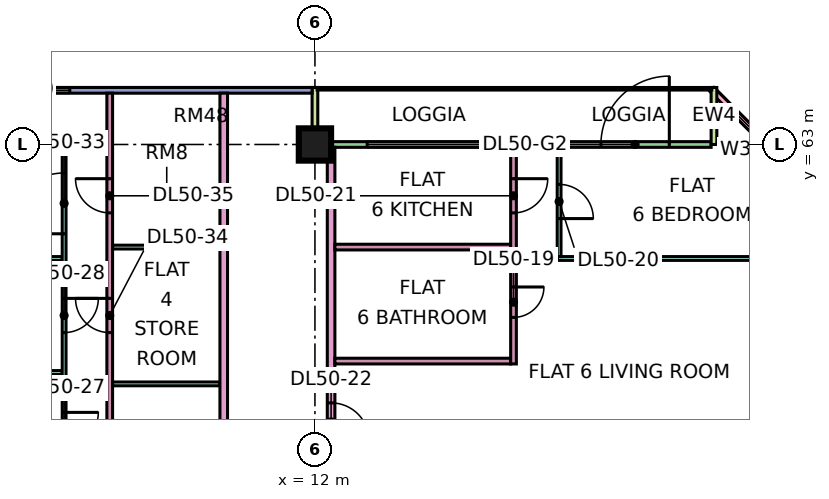
"""IFC4 building model, lengths in metres.
Left out: names, types, materials, properties, quantities, classifications, styles, units other than length and angle.
Written with IfcOpenShell. Run it as: python <this file> out.ifc"""

import sys

from ifc_helpers import new_model, si_unit, direction, frame, frame_2d, origin, origin_2d, place, context, subcontext, project, spatial, rectangle, extrude, element, fill, save


model = new_model("IFC4")
c1 = context("Model", 3, precision=1e-05, world=origin(), true_north=direction((0.0, 1.0)))
c2 = subcontext(c1, "Body", "Model", "MODEL_VIEW")
j1 = project(units=[si_unit("LENGTHUNIT", "METRE"), si_unit("PLANEANGLEUNIT", "RADIAN")], contexts=[c1])
p1 = place(None, origin())
s1 = spatial("IfcSite", under=j1, at=p1, CompositionType="ELEMENT")
p2 = place(p1, origin())
s2 = spatial("IfcBuilding", under=s1, at=p2, CompositionType="ELEMENT")
p3 = place(p2, frame((0.0, 0.0, 215.4)))
s3 = spatial("IfcBuildingStorey", under=s2, at=p3, CompositionType="ELEMENT", Elevation=215.4)
p4 = place(p3, frame((12.0, 63.0, 0.0), z_axis=(0.0, 0.0, 1.0), x_axis=(1.0, 0.0, 0.0)))
e1 = element("IfcColumn", 1, at=p4, inside=s3, PredefinedType="COLUMN", context=c2, shape_type="SweptSolid", body=[
    extrude(rectangle(XDim=0.85, YDim=0.85, at=origin_2d()), origin(), (0.0, 0.0, 1.0), 3.75),
])
p5 = place(p3, frame((25.447, 61.447, 0.0), z_axis=(0.0, 0.0, 1.0), x_axis=(-0.707106781187, 0.707106781187, 0.0)))
e2 = element("IfcWall", 2, at=p5, inside=s3, PredefinedType="SOLIDWALL", context=c2, shape_type="SweptSolid", body=[
    extrude(rectangle(XDim=4.243, YDim=0.15, at=frame_2d((2.121, 0.0))), origin(), (0.0, 0.0, 1.0), 3.35),
])
p6 = place(p5, frame((0.498, 0.0, 0.45)))
e3 = element("IfcOpeningElement", 3, at=p6, cuts=e2, PredefinedType="OPENING", context=c2, shape_type="SweptSolid", body=[
    extrude(rectangle(XDim=3.0, YDim=2.4, at=frame_2d((1.5, 1.2))), frame((0.0, 0.085, 0.0), z_axis=(0.0, -1.0, 0.0), x_axis=(1.0, 0.0, 0.0)), (0.0, 0.0, 1.0), 0.17),
])
p7 = place(p3, frame((22.425, 63.0, 0.0), z_axis=(0.0, 0.0, 1.0), x_axis=(-1.0, 0.0, 0.0)))
e4 = element("IfcWall", 4, at=p7, inside=s3, PredefinedType="SOLIDWALL", context=c2, shape_type="SweptSolid", body=[
    extrude(rectangle(XDim=10.35, YDim=0.15, at=frame_2d((5.175, 0.0))), origin(), (0.0, 0.0, 1.0), 3.35),
])
p8 = place(p7, frame((1.1, 0.0, 0.0)))
e5 = element("IfcOpeningElement", 5, at=p8, cuts=e4, PredefinedType="OPENING", context=c2, shape_type="SweptSolid", body=[
    extrude(rectangle(XDim=1.8, YDim=2.4, at=frame_2d((0.9, 1.2))), frame((0.0, 0.085, 0.0), z_axis=(0.0, -1.0, 0.0), x_axis=(1.0, 0.0, 0.0)), (0.0, 0.0, 1.0), 0.17),
])
p9 = place(p7, frame((6.05, 0.0, 0.45)))
e6 = element("IfcOpeningElement", 6, at=p9, cuts=e4, PredefinedType="OPENING", context=c2, shape_type="SweptSolid", body=[
    extrude(rectangle(XDim=3.0, YDim=2.4, at=frame_2d((1.5, 1.2))), frame((0.0, 0.085, 0.0), z_axis=(0.0, -1.0, 0.0), x_axis=(1.0, 0.0, 0.0)), (0.0, 0.0, 1.0), 0.17),
])
for number, where, z_axis, x_axis in (
    (7, (22.5, 64.5, 0.0), (0.0, 0.0, 1.0), (0.0, -1.0, 0.0)),
    (8, (12.0, 64.5, 0.0), (0.0, 0.0, 1.0), (0.0, -1.0, 0.0)),
):
    element("IfcWall", number, at=place(p3, frame(where, z_axis=z_axis, x_axis=x_axis)), inside=s3, PredefinedType="SOLIDWALL", context=c2, shape_type="SweptSolid", body=[
        extrude(rectangle(XDim=1.5, YDim=0.15, at=frame_2d((0.75, 0.0))), origin(), (0.0, 0.0, 1.0), 3.35),
    ])
p10 = place(p3, frame((11.925, 64.425, 0.0), z_axis=(0.0, 0.0, 1.0), x_axis=(-1.0, 0.0, 0.0)))
e9 = element("IfcWall", 9, at=p10, inside=s3, PredefinedType="SOLIDWALL", context=c2, shape_type="SweptSolid", body=[
    extrude(rectangle(XDim=10.425, YDim=0.15, at=frame_2d((5.212, 0.0))), origin(), (0.0, 0.0, 1.0), 3.35),
])
p11 = place(p10, frame((6.375, 0.0, 0.45)))
e10 = element("IfcOpeningElement", 10, at=p11, cuts=e9, PredefinedType="OPENING", context=c2, shape_type="SweptSolid", body=[
    extrude(rectangle(XDim=3.6, YDim=2.4, at=frame_2d((1.8, 1.2))), frame((0.0, 0.085, 0.0), z_axis=(0.0, -1.0, 0.0), x_axis=(1.0, 0.0, 0.0)), (0.0, 0.0, 1.0), 0.17),
])
for number, where, z_axis, x_axis in (
    (11, (-1.351, 57.0, 0.0), (0.0, 0.0, 1.0), (1.0, 0.0, 0.0)),
    (12, (-1.351, 60.0, 0.0), (0.0, 0.0, 1.0), (1.0, 0.0, 0.0)),
):
    element("IfcWall", number, at=place(p3, frame(where, z_axis=z_axis, x_axis=x_axis)), inside=s3, PredefinedType="PARTITIONING", context=c2, shape_type="SweptSolid", body=[
        extrude(rectangle(XDim=6.701, YDim=0.1, at=frame_2d((3.351, 0.0))), origin(), (0.0, 0.0, 1.0), 3.35),
    ])
p12 = place(p3, frame((5.4, 36.1, 0.0), z_axis=(0.0, 0.0, 1.0), x_axis=(0.0, 1.0, 0.0)))
e13 = element("IfcWall", 13, at=p12, inside=s3, PredefinedType="PARTITIONING", context=c2, shape_type="SweptSolid", body=[
    extrude(rectangle(XDim=26.95, YDim=0.1, at=frame_2d((13.475, 0.0))), origin(), (0.0, 0.0, 1.0), 3.35),
])
p13 = place(p12, frame((0.95, 0.0, 0.0)))
e14 = element("IfcOpeningElement", 14, at=p13, cuts=e13, PredefinedType="OPENING", context=c2, shape_type="SweptSolid", body=[
    extrude(rectangle(XDim=0.9, YDim=2.1, at=frame_2d((0.45, 1.05))), frame((0.0, 0.06, 0.0), z_axis=(0.0, -1.0, 0.0), x_axis=(1.0, 0.0, 0.0)), (0.0, 0.0, 1.0), 0.12),
])
p14 = place(p12, frame((3.95, 0.0, 0.0)))
e15 = element("IfcOpeningElement", 15, at=p14, cuts=e13, PredefinedType="OPENING", context=c2, shape_type="SweptSolid", body=[
    extrude(rectangle(XDim=0.9, YDim=2.1, at=frame_2d((0.45, 1.05))), frame((0.0, 0.06, 0.0), z_axis=(0.0, -1.0, 0.0), x_axis=(1.0, 0.0, 0.0)), (0.0, 0.0, 1.0), 0.12),
])
p15 = place(p12, frame((15.95, 0.0, 0.0)))
e16 = element("IfcOpeningElement", 16, at=p15, cuts=e13, PredefinedType="OPENING", context=c2, shape_type="SweptSolid", body=[
    extrude(rectangle(XDim=0.9, YDim=2.1, at=frame_2d((0.45, 1.05))), frame((0.0, 0.06, 0.0), z_axis=(0.0, -1.0, 0.0), x_axis=(1.0, 0.0, 0.0)), (0.0, 0.0, 1.0), 0.12),
])
p16 = place(p12, frame((18.95, 0.0, 0.0)))
e17 = element("IfcOpeningElement", 17, at=p16, cuts=e13, PredefinedType="OPENING", context=c2, shape_type="SweptSolid", body=[
    extrude(rectangle(XDim=0.9, YDim=2.1, at=frame_2d((0.45, 1.05))), frame((0.0, 0.06, 0.0), z_axis=(0.0, -1.0, 0.0), x_axis=(1.0, 0.0, 0.0)), (0.0, 0.0, 1.0), 0.12),
])
p17 = place(p12, frame((21.95, 0.0, 0.0)))
e18 = element("IfcOpeningElement", 18, at=p17, cuts=e13, PredefinedType="OPENING", context=c2, shape_type="SweptSolid", body=[
    extrude(rectangle(XDim=0.9, YDim=2.1, at=frame_2d((0.45, 1.05))), frame((0.0, 0.06, 0.0), z_axis=(0.0, -1.0, 0.0), x_axis=(1.0, 0.0, 0.0)), (0.0, 0.0, 1.0), 0.12),
])
p18 = place(p12, frame((9.95, 0.0, 0.0)))
e19 = element("IfcOpeningElement", 19, at=p18, cuts=e13, PredefinedType="OPENING", context=c2, shape_type="SweptSolid", body=[
    extrude(rectangle(XDim=0.9, YDim=2.1, at=frame_2d((0.45, 1.05))), frame((0.0, 0.06, 0.0), z_axis=(0.0, -1.0, 0.0), x_axis=(1.0, 0.0, 0.0)), (0.0, 0.0, 1.0), 0.12),
])
p19 = place(p12, frame((24.55, 0.0, 0.0)))
e20 = element("IfcOpeningElement", 20, at=p19, cuts=e13, PredefinedType="OPENING", context=c2, shape_type="SweptSolid", body=[
    extrude(rectangle(XDim=1.6, YDim=2.1, at=frame_2d((0.8, 1.05))), frame((0.0, 0.06, 0.0), z_axis=(0.0, -1.0, 0.0), x_axis=(1.0, 0.0, 0.0)), (0.0, 0.0, 1.0), 0.12),
])
p20 = place(p3, frame((5.45, 63.0, 0.0), z_axis=(0.0, 0.0, 1.0), x_axis=(1.0, 0.0, 0.0)))
e21 = element("IfcWall", 21, at=p20, inside=s3, PredefinedType="PARTITIONING", context=c2, shape_type="SweptSolid", body=[
    extrude(rectangle(XDim=0.55, YDim=0.1, at=frame_2d((0.275, 0.0))), origin(), (0.0, 0.0, 1.0), 3.35),
])
p21 = place(p3, frame((6.6, 39.525, 0.0), z_axis=(0.0, 0.0, 1.0), x_axis=(0.0, 1.0, 0.0)))
e22 = element("IfcWall", 22, at=p21, inside=s3, PredefinedType="PARTITIONING", context=c2, shape_type="SweptSolid", body=[
    extrude(rectangle(XDim=24.825, YDim=0.15, at=frame_2d((12.413, 0.0))), origin(), (0.0, 0.0, 1.0), 3.35),
])
p22 = place(p21, frame((3.225, 0.0, 0.0)))
e23 = element("IfcOpeningElement", 23, at=p22, cuts=e22, PredefinedType="OPENING", context=c2, shape_type="SweptSolid", body=[
    extrude(rectangle(XDim=0.8, YDim=2.1, at=frame_2d((0.4, 1.05))), frame((0.0, 0.085, 0.0), z_axis=(0.0, -1.0, 0.0), x_axis=(1.0, 0.0, 0.0)), (0.0, 0.0, 1.0), 0.17),
])
p23 = place(p21, frame((13.875, 0.0, 0.0)))
e24 = element("IfcOpeningElement", 24, at=p23, cuts=e22, PredefinedType="OPENING", context=c2, shape_type="SweptSolid", body=[
    extrude(rectangle(XDim=0.9, YDim=2.1, at=frame_2d((0.45, 1.05))), frame((0.0, 0.085, 0.0), z_axis=(0.0, -1.0, 0.0), x_axis=(1.0, 0.0, 0.0)), (0.0, 0.0, 1.0), 0.17),
])
p24 = place(p21, frame((6.225, 0.0, 0.0)))
e25 = element("IfcOpeningElement", 25, at=p24, cuts=e22, PredefinedType="OPENING", context=c2, shape_type="SweptSolid", body=[
    extrude(rectangle(XDim=0.8, YDim=2.1, at=frame_2d((0.4, 1.05))), frame((0.0, 0.085, 0.0), z_axis=(0.0, -1.0, 0.0), x_axis=(1.0, 0.0, 0.0)), (0.0, 0.0, 1.0), 0.17),
])
p25 = place(p21, frame((18.525, 0.0, 0.0)))
e26 = element("IfcOpeningElement", 26, at=p25, cuts=e22, PredefinedType="OPENING", context=c2, shape_type="SweptSolid", body=[
    extrude(rectangle(XDim=0.9, YDim=2.1, at=frame_2d((0.45, 1.05))), frame((0.0, 0.085, 0.0), z_axis=(0.0, -1.0, 0.0), x_axis=(1.0, 0.0, 0.0)), (0.0, 0.0, 1.0), 0.17),
])
p26 = place(p21, frame((21.675, 0.0, 0.0)))
e27 = element("IfcOpeningElement", 27, at=p26, cuts=e22, PredefinedType="OPENING", context=c2, shape_type="SweptSolid", body=[
    extrude(rectangle(XDim=0.9, YDim=2.1, at=frame_2d((0.45, 1.05))), frame((0.0, 0.085, 0.0), z_axis=(0.0, -1.0, 0.0), x_axis=(1.0, 0.0, 0.0)), (0.0, 0.0, 1.0), 0.17),
])
p27 = place(p21, frame((9.375, 0.0, 0.0)))
e28 = element("IfcOpeningElement", 28, at=p27, cuts=e22, PredefinedType="OPENING", context=c2, shape_type="SweptSolid", body=[
    extrude(rectangle(XDim=0.8, YDim=2.1, at=frame_2d((0.4, 1.05))), frame((0.0, 0.085, 0.0), z_axis=(0.0, -1.0, 0.0), x_axis=(1.0, 0.0, 0.0)), (0.0, 0.0, 1.0), 0.17),
])
for number, where, z_axis, x_axis in (
    (29, (6.675, 56.7, 0.0), (0.0, 0.0, 1.0), (1.0, 0.0, 0.0)),
    (30, (6.675, 60.3, 0.0), (0.0, 0.0, 1.0), (1.0, 0.0, 0.0)),
):
    element("IfcWall", number, at=place(p3, frame(where, z_axis=z_axis, x_axis=x_axis)), inside=s3, PredefinedType="PARTITIONING", context=c2, shape_type="SweptSolid", body=[
        extrude(rectangle(XDim=2.825, YDim=0.1, at=frame_2d((1.413, 0.0))), origin(), (0.0, 0.0, 1.0), 3.35),
    ])
p28 = place(p3, frame((9.6, 20.0, 0.0), z_axis=(0.0, 0.0, 1.0), x_axis=(0.0, 1.0, 0.0)))
e31 = element("IfcWall", 31, at=p28, inside=s3, PredefinedType="PARTITIONING", context=c2, shape_type="SweptSolid", body=[
    extrude(rectangle(XDim=44.35, YDim=0.2, at=frame_2d((22.175, 0.0))), origin(), (0.0, 0.0, 1.0), 3.35),
])
p29 = place(p28, frame((17.25, 0.0, 0.0)))
e32 = element("IfcOpeningElement", 32, at=p29, cuts=e31, PredefinedType="OPENING", context=c2, shape_type="SweptSolid", body=[
    extrude(rectangle(XDim=1.0, YDim=2.1, at=frame_2d((0.5, 1.05))), frame((0.0, 0.11, 0.0), z_axis=(0.0, -1.0, 0.0), x_axis=(1.0, 0.0, 0.0)), (0.0, 0.0, 1.0), 0.22),
])
p30 = place(p28, frame((0.6, 0.0, 0.0)))
e33 = element("IfcOpeningElement", 33, at=p30, cuts=e31, PredefinedType="OPENING", context=c2, shape_type="SweptSolid", body=[
    extrude(rectangle(XDim=1.2, YDim=2.1, at=frame_2d((0.6, 1.05))), frame((0.0, 0.11, 0.0), z_axis=(0.0, -1.0, 0.0), x_axis=(1.0, 0.0, 0.0)), (0.0, 0.0, 1.0), 0.22),
])
p31 = place(p28, frame((4.35, 0.0, 0.0)))
e34 = element("IfcOpeningElement", 34, at=p31, cuts=e31, PredefinedType="OPENING", context=c2, shape_type="SweptSolid", body=[
    extrude(rectangle(XDim=1.0, YDim=2.1, at=frame_2d((0.5, 1.05))), frame((0.0, 0.11, 0.0), z_axis=(0.0, -1.0, 0.0), x_axis=(1.0, 0.0, 0.0)), (0.0, 0.0, 1.0), 0.22),
])
p32 = place(p3, frame((12.425, 20.0, 0.0), z_axis=(0.0, 0.0, 1.0), x_axis=(0.0, 1.0, 0.0)))
e35 = element("IfcWall", 35, at=p32, inside=s3, PredefinedType="PARTITIONING", context=c2, shape_type="SweptSolid", body=[
    extrude(rectangle(XDim=42.926, YDim=0.2, at=frame_2d((21.463, 0.0))), origin(), (0.0, 0.0, 1.0), 3.35),
])
p33 = place(p32, frame((7.0, 0.0, 0.0)))
e36 = element("IfcOpeningElement", 36, at=p33, cuts=e35, PredefinedType="OPENING", context=c2, shape_type="SweptSolid", body=[
    extrude(rectangle(XDim=1.0, YDim=2.1, at=frame_2d((0.5, 1.05))), frame((0.0, 0.11, 0.0), z_axis=(0.0, -1.0, 0.0), x_axis=(1.0, 0.0, 0.0)), (0.0, 0.0, 1.0), 0.22),
])
p34 = place(p32, frame((12.95, 0.0, 0.0)))
e37 = element("IfcOpeningElement", 37, at=p34, cuts=e35, PredefinedType="OPENING", context=c2, shape_type="SweptSolid", body=[
    extrude(rectangle(XDim=1.0, YDim=2.1, at=frame_2d((0.5, 1.05))), frame((0.0, 0.11, 0.0), z_axis=(0.0, -1.0, 0.0), x_axis=(1.0, 0.0, 0.0)), (0.0, 0.0, 1.0), 0.22),
])
p35 = place(p32, frame((23.35, 0.0, 0.0)))
e38 = element("IfcOpeningElement", 38, at=p35, cuts=e35, PredefinedType="OPENING", context=c2, shape_type="SweptSolid", body=[
    extrude(rectangle(XDim=1.0, YDim=2.1, at=frame_2d((0.5, 1.05))), frame((0.0, 0.11, 0.0), z_axis=(0.0, -1.0, 0.0), x_axis=(1.0, 0.0, 0.0)), (0.0, 0.0, 1.0), 0.22),
])
p36 = place(p32, frame((35.2, 0.0, 0.0)))
e39 = element("IfcOpeningElement", 39, at=p36, cuts=e35, PredefinedType="OPENING", context=c2, shape_type="SweptSolid", body=[
    extrude(rectangle(XDim=1.0, YDim=2.1, at=frame_2d((0.5, 1.05))), frame((0.0, 0.11, 0.0), z_axis=(0.0, -1.0, 0.0), x_axis=(1.0, 0.0, 0.0)), (0.0, 0.0, 1.0), 0.22),
])
p37 = place(p32, frame((1.15, 0.0, 0.0)))
e40 = element("IfcOpeningElement", 40, at=p37, cuts=e35, PredefinedType="OPENING", context=c2, shape_type="SweptSolid", body=[
    extrude(rectangle(XDim=1.8, YDim=2.1, at=frame_2d((0.9, 1.05))), frame((0.0, 0.11, 0.0), z_axis=(0.0, -1.0, 0.0), x_axis=(1.0, 0.0, 0.0)), (0.0, 0.0, 1.0), 0.22),
])
p38 = place(p32, frame((28.6, 0.0, 0.0)))
e41 = element("IfcOpeningElement", 41, at=p38, cuts=e35, PredefinedType="OPENING", context=c2, shape_type="SweptSolid", body=[
    extrude(rectangle(XDim=1.8, YDim=2.1, at=frame_2d((0.9, 1.05))), frame((0.0, 0.11, 0.0), z_axis=(0.0, -1.0, 0.0), x_axis=(1.0, 0.0, 0.0)), (0.0, 0.0, 1.0), 0.22),
])
for number, where, z_axis, x_axis in (
    (42, (12.525, 57.3, 0.0), (0.0, 0.0, 1.0), (1.0, 0.0, 0.0)),
    (43, (12.525, 60.3, 0.0), (0.0, 0.0, 1.0), (1.0, 0.0, 0.0)),
):
    element("IfcWall", number, at=place(p3, frame(where, z_axis=z_axis, x_axis=x_axis)), inside=s3, PredefinedType="PARTITIONING", context=c2, shape_type="SweptSolid", body=[
        extrude(rectangle(XDim=4.625, YDim=0.15, at=frame_2d((2.312, 0.0))), origin(), (0.0, 0.0, 1.0), 3.35),
    ])
p39 = place(p3, frame((17.225, 57.225, 0.0), z_axis=(0.0, 0.0, 1.0), x_axis=(0.0, 1.0, 0.0)))
e44 = element("IfcWall", 44, at=p39, inside=s3, PredefinedType="PARTITIONING", context=c2, shape_type="SweptSolid", body=[
    extrude(rectangle(XDim=5.701, YDim=0.15, at=frame_2d((2.851, 0.0))), origin(), (0.0, 0.0, 1.0), 3.35),
])
p40 = place(p39, frame((1.225, 0.0, 0.0)))
e45 = element("IfcOpeningElement", 45, at=p40, cuts=e44, PredefinedType="OPENING", context=c2, shape_type="SweptSolid", body=[
    extrude(rectangle(XDim=0.8, YDim=2.1, at=frame_2d((0.4, 1.05))), frame((0.0, 0.085, 0.0), z_axis=(0.0, -1.0, 0.0), x_axis=(1.0, 0.0, 0.0)), (0.0, 0.0, 1.0), 0.17),
])
p41 = place(p39, frame((3.975, 0.0, 0.0)))
e46 = element("IfcOpeningElement", 46, at=p41, cuts=e44, PredefinedType="OPENING", context=c2, shape_type="SweptSolid", body=[
    extrude(rectangle(XDim=0.9, YDim=2.1, at=frame_2d((0.45, 1.05))), frame((0.0, 0.085, 0.0), z_axis=(0.0, -1.0, 0.0), x_axis=(1.0, 0.0, 0.0)), (0.0, 0.0, 1.0), 0.17),
])
p42 = place(p3, frame((18.375, 60.0, 0.0), z_axis=(0.0, 0.0, 1.0), x_axis=(1.0, 0.0, 0.0)))
e47 = element("IfcWall", 47, at=p42, inside=s3, PredefinedType="PARTITIONING", context=c2, shape_type="SweptSolid", body=[
    extrude(rectangle(XDim=6.975, YDim=0.1, at=frame_2d((3.488, 0.0))), origin(), (0.0, 0.0, 1.0), 3.35),
])
p43 = place(p3, frame((18.425, 60.05, 0.0), z_axis=(0.0, 0.0, 1.0), x_axis=(0.0, 1.0, 0.0)))
e48 = element("IfcWall", 48, at=p43, inside=s3, PredefinedType="PARTITIONING", context=c2, shape_type="SweptSolid", body=[
    extrude(rectangle(XDim=2.876, YDim=0.1, at=frame_2d((1.438, 0.0))), origin(), (0.0, 0.0, 1.0), 3.35),
])
p44 = place(p43, frame((1.0, 0.0, 0.0)))
e49 = element("IfcOpeningElement", 49, at=p44, cuts=e48, PredefinedType="OPENING", context=c2, shape_type="SweptSolid", body=[
    extrude(rectangle(XDim=0.9, YDim=2.1, at=frame_2d((0.45, 1.05))), frame((0.0, 0.06, 0.0), z_axis=(0.0, -1.0, 0.0), x_axis=(1.0, 0.0, 0.0)), (0.0, 0.0, 1.0), 0.12),
])
p45 = place(p6, origin())
e50 = element("IfcWindow", 50, at=p45, inside=s3, PartitioningType="SINGLE_PANEL", PredefinedType="WINDOW", context=c2, shape_type="SweptSolid", body=[
    extrude(rectangle(XDim=3.0, YDim=2.4, at=frame_2d((1.5, 1.2))), frame((0.0, 0.03, 0.0), z_axis=(0.0, -1.0, 0.0), x_axis=(1.0, 0.0, 0.0)), (0.0, 0.0, 1.0), 0.06),
])
fill(e3, e50)
p46 = place(p8, frame((1.8, 0.0, 0.0), z_axis=(0.0, 0.0, 1.0), x_axis=(-1.0, 0.0, 0.0)))
e51 = element("IfcDoor", 51, at=p46, inside=s3, OperationType="DOUBLE_DOOR_SINGLE_SWING", PredefinedType="DOOR", context=c2, shape_type="SweptSolid", body=[
    extrude(rectangle(XDim=1.8, YDim=2.4, at=frame_2d((0.9, 1.2))), frame((0.0, 0.025, 0.0), z_axis=(0.0, -1.0, 0.0), x_axis=(1.0, 0.0, 0.0)), (0.0, 0.0, 1.0), 0.05),
])
fill(e5, e51)
p47 = place(p9, origin())
e52 = element("IfcWindow", 52, at=p47, inside=s3, PartitioningType="SINGLE_PANEL", PredefinedType="WINDOW", context=c2, shape_type="SweptSolid", body=[
    extrude(rectangle(XDim=3.0, YDim=2.4, at=frame_2d((1.5, 1.2))), frame((0.0, 0.03, 0.0), z_axis=(0.0, -1.0, 0.0), x_axis=(1.0, 0.0, 0.0)), (0.0, 0.0, 1.0), 0.06),
])
fill(e6, e52)
p48 = place(p11, origin())
e53 = element("IfcWindow", 53, at=p48, inside=s3, PartitioningType="SINGLE_PANEL", PredefinedType="WINDOW", context=c2, shape_type="SweptSolid", body=[
    extrude(rectangle(XDim=3.6, YDim=2.4, at=frame_2d((1.8, 1.2))), frame((0.0, 0.03, 0.0), z_axis=(0.0, -1.0, 0.0), x_axis=(1.0, 0.0, 0.0)), (0.0, 0.0, 1.0), 0.06),
])
fill(e10, e53)
p49 = place(p40, origin())
e54 = element("IfcDoor", 54, at=p49, inside=s3, OperationType="SINGLE_SWING_RIGHT", PredefinedType="DOOR", context=c2, shape_type="SweptSolid", body=[
    extrude(rectangle(XDim=0.8, YDim=2.1, at=frame_2d((0.4, 1.05))), frame((0.0, 0.025, 0.0), z_axis=(0.0, -1.0, 0.0), x_axis=(1.0, 0.0, 0.0)), (0.0, 0.0, 1.0), 0.05),
])
fill(e45, e54)
p50 = place(p44, frame((0.9, 0.0, 0.0), z_axis=(0.0, 0.0, 1.0), x_axis=(-1.0, 0.0, 0.0)))
e55 = element("IfcDoor", 55, at=p50, inside=s3, OperationType="SINGLE_SWING_LEFT", PredefinedType="DOOR", context=c2, shape_type="SweptSolid", body=[
    extrude(rectangle(XDim=0.9, YDim=2.1, at=frame_2d((0.45, 1.05))), frame((0.0, 0.025, 0.0), z_axis=(0.0, -1.0, 0.0), x_axis=(1.0, 0.0, 0.0)), (0.0, 0.0, 1.0), 0.05),
])
fill(e49, e55)
p51 = place(p41, origin())
e56 = element("IfcDoor", 56, at=p51, inside=s3, OperationType="SINGLE_SWING_RIGHT", PredefinedType="DOOR", context=c2, shape_type="SweptSolid", body=[
    extrude(rectangle(XDim=0.9, YDim=2.1, at=frame_2d((0.45, 1.05))), frame((0.0, 0.025, 0.0), z_axis=(0.0, -1.0, 0.0), x_axis=(1.0, 0.0, 0.0)), (0.0, 0.0, 1.0), 0.05),
])
fill(e46, e56)
p52 = place(p36, frame((1.0, 0.0, 0.0), z_axis=(0.0, 0.0, 1.0), x_axis=(-1.0, 0.0, 0.0)))
e57 = element("IfcDoor", 57, at=p52, inside=s3, OperationType="SINGLE_SWING_LEFT", PredefinedType="DOOR", context=c2, shape_type="SweptSolid", body=[
    extrude(rectangle(XDim=1.0, YDim=2.1, at=frame_2d((0.5, 1.05))), frame((0.0, 0.025, 0.0), z_axis=(0.0, -1.0, 0.0), x_axis=(1.0, 0.0, 0.0)), (0.0, 0.0, 1.0), 0.05),
])
fill(e39, e57)
p53 = place(p16, origin())
e58 = element("IfcDoor", 58, at=p53, inside=s3, OperationType="SINGLE_SWING_RIGHT", PredefinedType="DOOR", context=c2, shape_type="SweptSolid", body=[
    extrude(rectangle(XDim=0.9, YDim=2.1, at=frame_2d((0.45, 1.05))), frame((0.0, 0.025, 0.0), z_axis=(0.0, -1.0, 0.0), x_axis=(1.0, 0.0, 0.0)), (0.0, 0.0, 1.0), 0.05),
])
fill(e17, e58)
p54 = place(p17, origin())
e59 = element("IfcDoor", 59, at=p54, inside=s3, OperationType="SINGLE_SWING_RIGHT", PredefinedType="DOOR", context=c2, shape_type="SweptSolid", body=[
    extrude(rectangle(XDim=0.9, YDim=2.1, at=frame_2d((0.45, 1.05))), frame((0.0, 0.025, 0.0), z_axis=(0.0, -1.0, 0.0), x_axis=(1.0, 0.0, 0.0)), (0.0, 0.0, 1.0), 0.05),
])
fill(e18, e59)
p55 = place(p19, origin())
e60 = element("IfcDoor", 60, at=p55, inside=s3, OperationType="DOUBLE_DOOR_SINGLE_SWING", PredefinedType="DOOR", context=c2, shape_type="SweptSolid", body=[
    extrude(rectangle(XDim=1.6, YDim=2.1, at=frame_2d((0.8, 1.05))), frame((0.0, 0.025, 0.0), z_axis=(0.0, -1.0, 0.0), x_axis=(1.0, 0.0, 0.0)), (0.0, 0.0, 1.0), 0.05),
])
fill(e20, e60)
p56 = place(p25, frame((0.9, 0.0, 0.0), z_axis=(0.0, 0.0, 1.0), x_axis=(-1.0, 0.0, 0.0)))
e61 = element("IfcDoor", 61, at=p56, inside=s3, OperationType="SINGLE_SWING_RIGHT", PredefinedType="DOOR", context=c2, shape_type="SweptSolid", body=[
    extrude(rectangle(XDim=0.9, YDim=2.1, at=frame_2d((0.45, 1.05))), frame((0.0, 0.025, 0.0), z_axis=(0.0, -1.0, 0.0), x_axis=(1.0, 0.0, 0.0)), (0.0, 0.0, 1.0), 0.05),
])
fill(e26, e61)
p57 = place(p26, frame((0.9, 0.0, 0.0), z_axis=(0.0, 0.0, 1.0), x_axis=(-1.0, 0.0, 0.0)))
e62 = element("IfcDoor", 62, at=p57, inside=s3, OperationType="SINGLE_SWING_RIGHT", PredefinedType="DOOR", context=c2, shape_type="SweptSolid", body=[
    extrude(rectangle(XDim=0.9, YDim=2.1, at=frame_2d((0.45, 1.05))), frame((0.0, 0.025, 0.0), z_axis=(0.0, -1.0, 0.0), x_axis=(1.0, 0.0, 0.0)), (0.0, 0.0, 1.0), 0.05),
])
fill(e27, e62)
save(model, sys.argv[1])
